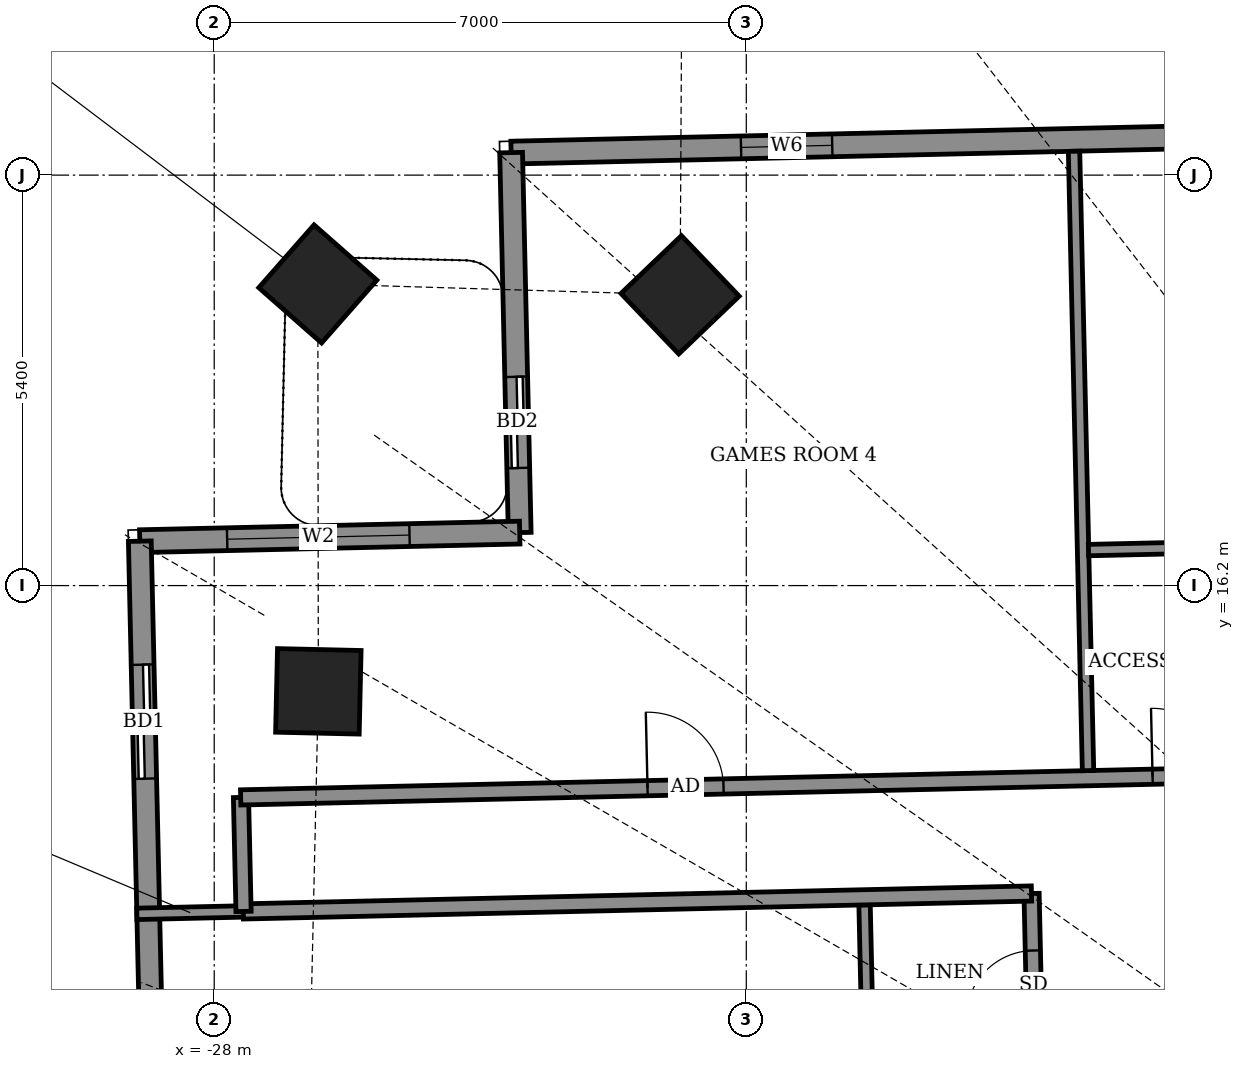
"""IFC4 building model, lengths in metres.
Left out: names, types, materials, properties, quantities, classifications, styles, units other than length and angle.
Written with IfcOpenShell. Run it as: python <this file> out.ifc"""

import sys

from ifc_helpers import new_model, si_unit, direction, frame, frame_2d, origin, origin_2d, place, context, subcontext, project, spatial, rectangle, extrude, element, fill, save


model = new_model("IFC4")
c1 = context("Model", 3, precision=1e-05, world=origin(), true_north=direction((0.0, 1.0)))
c2 = subcontext(c1, "Body", "Model", "MODEL_VIEW")
j1 = project(units=[si_unit("LENGTHUNIT", "METRE"), si_unit("PLANEANGLEUNIT", "RADIAN")], contexts=[c1])
p1 = place(None, origin())
s1 = spatial("IfcSite", under=j1, at=p1, CompositionType="ELEMENT")
p2 = place(p1, origin())
s2 = spatial("IfcBuilding", under=s1, at=p2, CompositionType="ELEMENT")
p3 = place(p2, frame((0.0, 0.0, 226.5)))
s3 = spatial("IfcBuildingStorey", under=s2, at=p3, CompositionType="ELEMENT", Elevation=226.5)
for number, where, z_axis, x_axis in (
    (1, (-21.871, 20.025, -0.55), (0.0, 0.0, 1.0), (-0.723, -0.691, 0.0)),
    (2, (-26.637, 20.169, -0.55), (0.0, 0.0, 1.0), (-0.661, -0.751, 0.0)),
    (3, (-26.63, 14.809, -0.55), (0.0, 0.0, 1.0), (-0.023, -1.0, 0.0)),
):
    element("IfcColumn", number, at=place(p3, frame(where, z_axis=z_axis, x_axis=x_axis)), inside=s3, PredefinedType="COLUMN", context=c2, shape_type="SweptSolid", body=[
        extrude(rectangle(XDim=1.1, YDim=1.1, at=origin_2d()), origin(), (0.0, 0.0, 1.0), 4.6),
    ])
p4 = place(p3, frame((20.403, 22.905, 0.0), z_axis=(0.0, 0.0, 1.0), x_axis=(-0.99974298964, -0.022670568288, 0.0)))
e4 = element("IfcWall", 4, at=p4, inside=s3, PredefinedType="SOLIDWALL", context=c2, shape_type="SweptSolid", body=[
    extrude(rectangle(XDim=44.509, YDim=0.3, at=frame_2d((22.254, 0.0))), origin(), (0.0, 0.0, 1.0), 2.45),
])
p5 = place(p4, frame((2.846, 0.0, 0.0)))
e5 = element("IfcOpeningElement", 5, at=p5, cuts=e4, PredefinedType="OPENING", context=c2, shape_type="SweptSolid", body=[
    extrude(rectangle(XDim=1.5, YDim=2.0, at=frame_2d((0.75, 1.0))), frame((0.0, 0.16, 0.0), z_axis=(0.0, -1.0, 0.0), x_axis=(1.0, 0.0, 0.0)), (0.0, 0.0, 1.0), 0.32),
])
p6 = place(p4, frame((9.937, 0.0, 0.5)))
e6 = element("IfcOpeningElement", 6, at=p6, cuts=e4, PredefinedType="OPENING", context=c2, shape_type="SweptSolid", body=[
    extrude(rectangle(XDim=1.2, YDim=1.1, at=frame_2d((0.6, 0.55))), frame((0.0, 0.16, 0.0), z_axis=(0.0, -1.0, 0.0), x_axis=(1.0, 0.0, 0.0)), (0.0, 0.0, 1.0), 0.32),
])
p7 = place(p4, frame((17.433, 0.0, 0.5)))
e7 = element("IfcOpeningElement", 7, at=p7, cuts=e4, PredefinedType="OPENING", context=c2, shape_type="SweptSolid", body=[
    extrude(rectangle(XDim=1.2, YDim=1.1, at=frame_2d((0.6, 0.55))), frame((0.0, 0.16, 0.0), z_axis=(0.0, -1.0, 0.0), x_axis=(1.0, 0.0, 0.0)), (0.0, 0.0, 1.0), 0.32),
])
p8 = place(p4, frame((22.808, 0.0, 0.0)))
e8 = element("IfcOpeningElement", 8, at=p8, cuts=e4, PredefinedType="OPENING", context=c2, shape_type="SweptSolid", body=[
    extrude(rectangle(XDim=1.5, YDim=2.0, at=frame_2d((0.75, 1.0))), frame((0.0, 0.16, 0.0), z_axis=(0.0, -1.0, 0.0), x_axis=(1.0, 0.0, 0.0)), (0.0, 0.0, 1.0), 0.32),
])
p9 = place(p4, frame((27.808, 0.0, 0.0)))
e9 = element("IfcOpeningElement", 9, at=p9, cuts=e4, PredefinedType="OPENING", context=c2, shape_type="SweptSolid", body=[
    extrude(rectangle(XDim=1.5, YDim=2.0, at=frame_2d((0.75, 1.0))), frame((0.0, 0.16, 0.0), z_axis=(0.0, -1.0, 0.0), x_axis=(1.0, 0.0, 0.0)), (0.0, 0.0, 1.0), 0.32),
])
p10 = place(p4, frame((33.483, 0.0, 0.5)))
e10 = element("IfcOpeningElement", 10, at=p10, cuts=e4, PredefinedType="OPENING", context=c2, shape_type="SweptSolid", body=[
    extrude(rectangle(XDim=1.2, YDim=1.1, at=frame_2d((0.6, 0.55))), frame((0.0, 0.16, 0.0), z_axis=(0.0, -1.0, 0.0), x_axis=(1.0, 0.0, 0.0)), (0.0, 0.0, 1.0), 0.32),
])
p11 = place(p4, frame((40.283, 0.0, 0.5)))
e11 = element("IfcOpeningElement", 11, at=p11, cuts=e4, PredefinedType="OPENING", context=c2, shape_type="SweptSolid", body=[
    extrude(rectangle(XDim=1.2, YDim=1.1, at=frame_2d((0.6, 0.55))), frame((0.0, 0.16, 0.0), z_axis=(0.0, -1.0, 0.0), x_axis=(1.0, 0.0, 0.0)), (0.0, 0.0, 1.0), 0.32),
])
p12 = place(p3, frame((-24.094, 21.896, 0.0), z_axis=(0.0, 0.0, 1.0), x_axis=(0.022606059803, -0.999744450377, 0.0)))
e12 = element("IfcWall", 12, at=p12, inside=s3, PredefinedType="SOLIDWALL", context=c2, shape_type="SweptSolid", body=[
    extrude(rectangle(XDim=5.0, YDim=0.3, at=frame_2d((2.5, 0.0))), origin(), (0.0, 0.0, 1.0), 2.55),
])
p13 = place(p12, frame((2.95, 0.0, 0.0)))
e13 = element("IfcOpeningElement", 13, at=p13, cuts=e12, PredefinedType="OPENING", context=c2, shape_type="SweptSolid", body=[
    extrude(rectangle(XDim=1.2, YDim=2.4, at=frame_2d((0.6, 1.2))), frame((0.0, 0.16, 0.0), z_axis=(0.0, -1.0, 0.0), x_axis=(1.0, 0.0, 0.0)), (0.0, 0.0, 1.0), 0.32),
])
p14 = place(p3, frame((-23.981, 16.897, 0.0), z_axis=(0.0, 0.0, 1.0), x_axis=(-0.999744350543, -0.022610474516, 0.0)))
e14 = element("IfcWall", 14, at=p14, inside=s3, PredefinedType="SOLIDWALL", context=c2, shape_type="SweptSolid", body=[
    extrude(rectangle(XDim=4.999, YDim=0.3, at=frame_2d((2.5, 0.0))), origin(), (0.0, 0.0, 1.0), 2.55),
])
p15 = place(p14, frame((1.45, 0.0, 0.9)))
e15 = element("IfcOpeningElement", 15, at=p15, cuts=e14, PredefinedType="OPENING", context=c2, shape_type="SweptSolid", body=[
    extrude(rectangle(XDim=2.4, YDim=1.5, at=frame_2d((1.2, 0.75))), frame((0.0, 0.16, 0.0), z_axis=(0.0, -1.0, 0.0), x_axis=(1.0, 0.0, 0.0)), (0.0, 0.0, 1.0), 0.32),
])
p16 = place(p3, frame((-28.979, 16.784, 0.0), z_axis=(0.0, 0.0, 1.0), x_axis=(0.022639069896, -0.999743703413, 0.0)))
e16 = element("IfcWall", 16, at=p16, inside=s3, PredefinedType="SOLIDWALL", context=c2, shape_type="SweptSolid", body=[
    extrude(rectangle(XDim=12.326, YDim=0.3, at=frame_2d((6.163, 0.0))), origin(), (0.0, 0.0, 1.0), 2.65),
])
p17 = place(p16, frame((1.625, 0.0, 0.0)))
e17 = element("IfcOpeningElement", 17, at=p17, cuts=e16, PredefinedType="OPENING", context=c2, shape_type="SweptSolid", body=[
    extrude(rectangle(XDim=1.5, YDim=2.4, at=frame_2d((0.75, 1.2))), frame((0.0, 0.16, 0.0), z_axis=(0.0, -1.0, 0.0), x_axis=(1.0, 0.0, 0.0)), (0.0, 0.0, 1.0), 0.32),
])
p18 = place(p16, frame((7.338, 0.0, 0.9)))
e18 = element("IfcOpeningElement", 18, at=p18, cuts=e16, PredefinedType="OPENING", context=c2, shape_type="SweptSolid", body=[
    extrude(rectangle(XDim=2.4, YDim=1.5, at=frame_2d((1.2, 0.75))), frame((0.0, 0.16, 0.0), z_axis=(0.0, -1.0, 0.0), x_axis=(1.0, 0.0, 0.0)), (0.0, 0.0, 1.0), 0.32),
])
p19 = place(p3, frame((-16.678, -12.919, 0.0), z_axis=(0.0, 0.0, 1.0), x_axis=(-0.022696191528, 0.999742408268, 0.0)))
e19 = element("IfcWall", 19, at=p19, inside=s3, PredefinedType="PARTITIONING", context=c2, shape_type="SweptSolid", body=[
    extrude(rectangle(XDim=25.074, YDim=0.2, at=frame_2d((12.537, 0.0))), origin(), (0.0, 0.0, 1.0), 2.65),
])
p20 = place(p19, frame((19.737, 0.0, 0.0)))
e20 = element("IfcOpeningElement", 20, at=p20, cuts=e19, PredefinedType="OPENING", context=c2, shape_type="SweptSolid", body=[
    extrude(rectangle(XDim=1.0, YDim=2.1, at=frame_2d((0.5, 1.05))), frame((0.0, 0.11, 0.0), z_axis=(0.0, -1.0, 0.0), x_axis=(1.0, 0.0, 0.0)), (0.0, 0.0, 1.0), 0.22),
])
p21 = place(p19, frame((23.424, 0.0, 0.0)))
e21 = element("IfcOpeningElement", 21, at=p21, cuts=e19, PredefinedType="OPENING", context=c2, shape_type="SweptSolid", body=[
    extrude(rectangle(XDim=0.9, YDim=2.1, at=frame_2d((0.45, 1.05))), frame((0.0, 0.11, 0.0), z_axis=(0.0, -1.0, 0.0), x_axis=(1.0, 0.0, 0.0)), (0.0, 0.0, 1.0), 0.22),
])
p22 = place(p19, frame((13.624, 0.0, 0.0)))
e22 = element("IfcOpeningElement", 22, at=p22, cuts=e19, PredefinedType="OPENING", context=c2, shape_type="SweptSolid", body=[
    extrude(rectangle(XDim=1.0, YDim=2.1, at=frame_2d((0.5, 1.05))), frame((0.0, 0.11, 0.0), z_axis=(0.0, -1.0, 0.0), x_axis=(1.0, 0.0, 0.0)), (0.0, 0.0, 1.0), 0.22),
])
p23 = place(p19, frame((16.049, 0.0, 0.0)))
e23 = element("IfcOpeningElement", 23, at=p23, cuts=e19, PredefinedType="OPENING", context=c2, shape_type="SweptSolid", body=[
    extrude(rectangle(XDim=0.9, YDim=2.1, at=frame_2d((0.45, 1.05))), frame((0.0, 0.11, 0.0), z_axis=(0.0, -1.0, 0.0), x_axis=(1.0, 0.0, 0.0)), (0.0, 0.0, 1.0), 0.22),
])
p24 = place(p19, frame((11.449, 0.0, 0.0)))
e24 = element("IfcOpeningElement", 24, at=p24, cuts=e19, PredefinedType="OPENING", context=c2, shape_type="SweptSolid", body=[
    extrude(rectangle(XDim=1.0, YDim=2.1, at=frame_2d((0.5, 1.05))), frame((0.0, 0.11, 0.0), z_axis=(0.0, -1.0, 0.0), x_axis=(1.0, 0.0, 0.0)), (0.0, 0.0, 1.0), 0.22),
])
p25 = place(p19, frame((9.199, 0.0, 0.0)))
e25 = element("IfcOpeningElement", 25, at=p25, cuts=e19, PredefinedType="OPENING", context=c2, shape_type="SweptSolid", body=[
    extrude(rectangle(XDim=0.9, YDim=2.1, at=frame_2d((0.45, 1.05))), frame((0.0, 0.11, 0.0), z_axis=(0.0, -1.0, 0.0), x_axis=(1.0, 0.0, 0.0)), (0.0, 0.0, 1.0), 0.22),
])
p26 = place(p19, frame((4.549, 0.0, 0.0)))
e26 = element("IfcOpeningElement", 26, at=p26, cuts=e19, PredefinedType="OPENING", context=c2, shape_type="SweptSolid", body=[
    extrude(rectangle(XDim=1.0, YDim=2.1, at=frame_2d((0.5, 1.05))), frame((0.0, 0.11, 0.0), z_axis=(0.0, -1.0, 0.0), x_axis=(1.0, 0.0, 0.0)), (0.0, 0.0, 1.0), 0.22),
])
p27 = place(p19, frame((6.799, 0.0, 0.0)))
e27 = element("IfcOpeningElement", 27, at=p27, cuts=e19, PredefinedType="OPENING", context=c2, shape_type="SweptSolid", body=[
    extrude(rectangle(XDim=0.9, YDim=2.1, at=frame_2d((0.45, 1.05))), frame((0.0, 0.11, 0.0), z_axis=(0.0, -1.0, 0.0), x_axis=(1.0, 0.0, 0.0)), (0.0, 0.0, 1.0), 0.22),
])
p28 = place(p3, frame((-19.392, 9.699, 0.0), z_axis=(0.0, 0.0, 1.0), x_axis=(-0.022603288534, 0.999744513037, 0.0)))
e28 = element("IfcWall", 28, at=p28, inside=s3, PredefinedType="PARTITIONING", context=c2, shape_type="SweptSolid", body=[
    extrude(rectangle(XDim=2.301, YDim=0.15, at=frame_2d((1.15, 0.0))), origin(), (0.0, 0.0, 1.0), 2.65),
])
p29 = place(p3, frame((-29.018, 11.881, 0.0), z_axis=(0.0, 0.0, 1.0), x_axis=(0.999740667531, 0.022772739949, 0.0)))
e29 = element("IfcWall", 29, at=p29, inside=s3, PredefinedType="PARTITIONING", context=c2, shape_type="SweptSolid", body=[
    extrude(rectangle(XDim=1.404, YDim=0.15, at=frame_2d((0.702, 0.0))), origin(), (0.0, 0.0, 1.0), 4.05),
])
p30 = place(p3, frame((-27.618, 11.913, 0.0), z_axis=(0.0, 0.0, 1.0), x_axis=(0.999741483035, 0.022736910479, 0.0)))
e30 = element("IfcWall", 30, at=p30, inside=s3, PredefinedType="PARTITIONING", context=c2, shape_type="SweptSolid", body=[
    extrude(rectangle(XDim=10.373, YDim=0.2, at=frame_2d((5.186, 0.0))), origin(), (0.0, 0.0, 1.0), 2.55),
])
p31 = place(p3, frame((-27.614, 11.913, 0.0), z_axis=(0.0, 0.0, 1.0), x_axis=(-0.022617910375, 0.999744182344, 0.0)))
e31 = element("IfcWall", 31, at=p31, inside=s3, PredefinedType="PARTITIONING", context=c2, shape_type="SweptSolid", body=[
    extrude(rectangle(XDim=1.5, YDim=0.2, at=frame_2d((0.75, 0.0))), origin(), (0.0, 0.0, 1.0), 4.05),
])
p32 = place(p3, frame((-27.652, 13.413, 0.0), z_axis=(0.0, 0.0, 1.0), x_axis=(0.999742712492, 0.022682786863, 0.0)))
e32 = element("IfcWall", 32, at=p32, inside=s3, PredefinedType="PARTITIONING", context=c2, shape_type="SweptSolid", body=[
    extrude(rectangle(XDim=49.113, YDim=0.2, at=frame_2d((24.556, 0.0))), origin(), (0.0, 0.0, 1.0), 2.45),
])
p33 = place(p32, frame((47.529, 0.0, 0.0)))
e33 = element("IfcOpeningElement", 33, at=p33, cuts=e32, PredefinedType="OPENING", context=c2, shape_type="SweptSolid", body=[
    extrude(rectangle(XDim=1.0, YDim=2.1, at=frame_2d((0.5, 1.05))), frame((0.0, 0.11, 0.0), z_axis=(0.0, -1.0, 0.0), x_axis=(1.0, 0.0, 0.0)), (0.0, 0.0, 1.0), 0.22),
])
p34 = place(p32, frame((41.6, 0.0, 0.0)))
e34 = element("IfcOpeningElement", 34, at=p34, cuts=e32, PredefinedType="OPENING", context=c2, shape_type="SweptSolid", body=[
    extrude(rectangle(XDim=0.9, YDim=2.1, at=frame_2d((0.45, 1.05))), frame((0.0, 0.11, 0.0), z_axis=(0.0, -1.0, 0.0), x_axis=(1.0, 0.0, 0.0)), (0.0, 0.0, 1.0), 0.22),
])
p35 = place(p32, frame((37.85, 0.0, 0.0)))
e35 = element("IfcOpeningElement", 35, at=p35, cuts=e32, PredefinedType="OPENING", context=c2, shape_type="SweptSolid", body=[
    extrude(rectangle(XDim=1.0, YDim=2.1, at=frame_2d((0.5, 1.05))), frame((0.0, 0.11, 0.0), z_axis=(0.0, -1.0, 0.0), x_axis=(1.0, 0.0, 0.0)), (0.0, 0.0, 1.0), 0.22),
])
p36 = place(p32, frame((34.1, 0.0, 0.0)))
e36 = element("IfcOpeningElement", 36, at=p36, cuts=e32, PredefinedType="OPENING", context=c2, shape_type="SweptSolid", body=[
    extrude(rectangle(XDim=0.9, YDim=2.1, at=frame_2d((0.45, 1.05))), frame((0.0, 0.11, 0.0), z_axis=(0.0, -1.0, 0.0), x_axis=(1.0, 0.0, 0.0)), (0.0, 0.0, 1.0), 0.22),
])
p37 = place(p32, frame((28.525, 0.0, 0.0)))
e37 = element("IfcOpeningElement", 37, at=p37, cuts=e32, PredefinedType="OPENING", context=c2, shape_type="SweptSolid", body=[
    extrude(rectangle(XDim=1.0, YDim=2.1, at=frame_2d((0.5, 1.05))), frame((0.0, 0.11, 0.0), z_axis=(0.0, -1.0, 0.0), x_axis=(1.0, 0.0, 0.0)), (0.0, 0.0, 1.0), 0.22),
])
p38 = place(p32, frame((31.6, 0.0, 0.0)))
e38 = element("IfcOpeningElement", 38, at=p38, cuts=e32, PredefinedType="OPENING", context=c2, shape_type="SweptSolid", body=[
    extrude(rectangle(XDim=0.9, YDim=2.1, at=frame_2d((0.45, 1.05))), frame((0.0, 0.11, 0.0), z_axis=(0.0, -1.0, 0.0), x_axis=(1.0, 0.0, 0.0)), (0.0, 0.0, 1.0), 0.22),
])
p39 = place(p32, frame((25.45, 0.0, 0.0)))
e39 = element("IfcOpeningElement", 39, at=p39, cuts=e32, PredefinedType="OPENING", context=c2, shape_type="SweptSolid", body=[
    extrude(rectangle(XDim=0.9, YDim=2.1, at=frame_2d((0.45, 1.05))), frame((0.0, 0.11, 0.0), z_axis=(0.0, -1.0, 0.0), x_axis=(1.0, 0.0, 0.0)), (0.0, 0.0, 1.0), 0.22),
])
p40 = place(p32, frame((18.05, 0.0, 0.0)))
e40 = element("IfcOpeningElement", 40, at=p40, cuts=e32, PredefinedType="OPENING", context=c2, shape_type="SweptSolid", body=[
    extrude(rectangle(XDim=0.9, YDim=2.1, at=frame_2d((0.45, 1.05))), frame((0.0, 0.11, 0.0), z_axis=(0.0, -1.0, 0.0), x_axis=(1.0, 0.0, 0.0)), (0.0, 0.0, 1.0), 0.22),
])
p41 = place(p32, frame((14.975, 0.0, 0.0)))
e41 = element("IfcOpeningElement", 41, at=p41, cuts=e32, PredefinedType="OPENING", context=c2, shape_type="SweptSolid", body=[
    extrude(rectangle(XDim=1.0, YDim=2.1, at=frame_2d((0.5, 1.05))), frame((0.0, 0.11, 0.0), z_axis=(0.0, -1.0, 0.0), x_axis=(1.0, 0.0, 0.0)), (0.0, 0.0, 1.0), 0.22),
])
p42 = place(p32, frame((12.0, 0.0, 0.0)))
e42 = element("IfcOpeningElement", 42, at=p42, cuts=e32, PredefinedType="OPENING", context=c2, shape_type="SweptSolid", body=[
    extrude(rectangle(XDim=0.9, YDim=2.1, at=frame_2d((0.45, 1.05))), frame((0.0, 0.11, 0.0), z_axis=(0.0, -1.0, 0.0), x_axis=(1.0, 0.0, 0.0)), (0.0, 0.0, 1.0), 0.22),
])
p43 = place(p32, frame((5.354, 0.0, 0.0)))
e43 = element("IfcOpeningElement", 43, at=p43, cuts=e32, PredefinedType="OPENING", context=c2, shape_type="SweptSolid", body=[
    extrude(rectangle(XDim=1.0, YDim=2.1, at=frame_2d((0.5, 1.05))), frame((0.0, 0.11, 0.0), z_axis=(0.0, -1.0, 0.0), x_axis=(1.0, 0.0, 0.0)), (0.0, 0.0, 1.0), 0.22),
])
p44 = place(p3, frame((-16.504, 13.766, 0.0), z_axis=(0.0, 0.0, 1.0), x_axis=(-0.022586673637, 0.999744888546, 0.0)))
e44 = element("IfcWall", 44, at=p44, inside=s3, PredefinedType="PARTITIONING", context=c2, shape_type="SweptSolid", body=[
    extrude(rectangle(XDim=8.15, YDim=0.15, at=frame_2d((4.075, 0.0))), origin(), (0.0, 0.0, 1.0), 2.45),
])
p45 = place(p3, frame((-16.498, 16.667, 0.0), z_axis=(0.0, 0.0, 1.0), x_axis=(0.99974392816, 0.022629142889, 0.0)))
e45 = element("IfcWall", 45, at=p45, inside=s3, PredefinedType="PARTITIONING", context=c2, shape_type="SweptSolid", body=[
    extrude(rectangle(XDim=2.525, YDim=0.15, at=frame_2d((1.262, 0.0))), origin(), (0.0, 0.0, 1.0), 4.05),
])
p46 = place(p11, origin())
e46 = element("IfcWindow", 46, at=p46, inside=s3, PartitioningType="SINGLE_PANEL", PredefinedType="WINDOW", context=c2, shape_type="SweptSolid", body=[
    extrude(rectangle(XDim=1.2, YDim=1.1, at=frame_2d((0.6, 0.55))), frame((0.0, 0.03, 0.0), z_axis=(0.0, -1.0, 0.0), x_axis=(1.0, 0.0, 0.0)), (0.0, 0.0, 1.0), 0.06),
])
fill(e11, e46)
p47 = place(p13, origin())
e47 = element("IfcDoor", 47, at=p47, inside=s3, OperationType="SLIDING_TO_LEFT", PredefinedType="DOOR", context=c2, shape_type="SweptSolid", body=[
    extrude(rectangle(XDim=1.2, YDim=2.4, at=frame_2d((0.6, 1.2))), frame((0.0, 0.025, 0.0), z_axis=(0.0, -1.0, 0.0), x_axis=(1.0, 0.0, 0.0)), (0.0, 0.0, 1.0), 0.05),
])
fill(e13, e47)
p48 = place(p15, origin())
e48 = element("IfcWindow", 48, at=p48, inside=s3, PartitioningType="DOUBLE_PANEL_VERTICAL", PredefinedType="WINDOW", context=c2, shape_type="SweptSolid", body=[
    extrude(rectangle(XDim=2.4, YDim=1.5, at=frame_2d((1.2, 0.75))), frame((0.0, 0.03, 0.0), z_axis=(0.0, -1.0, 0.0), x_axis=(1.0, 0.0, 0.0)), (0.0, 0.0, 1.0), 0.06),
])
fill(e15, e48)
p49 = place(p17, origin())
e49 = element("IfcDoor", 49, at=p49, inside=s3, OperationType="SLIDING_TO_LEFT", PredefinedType="DOOR", context=c2, shape_type="SweptSolid", body=[
    extrude(rectangle(XDim=1.5, YDim=2.4, at=frame_2d((0.75, 1.2))), frame((0.0, 0.025, 0.0), z_axis=(0.0, -1.0, 0.0), x_axis=(1.0, 0.0, 0.0)), (0.0, 0.0, 1.0), 0.05),
])
fill(e17, e49)
p50 = place(p42, origin())
e50 = element("IfcDoor", 50, at=p50, inside=s3, OperationType="SINGLE_SWING_LEFT", PredefinedType="DOOR", context=c2, shape_type="SweptSolid", body=[
    extrude(rectangle(XDim=0.9, YDim=2.1, at=frame_2d((0.45, 1.05))), frame((0.0, 0.025, 0.0), z_axis=(0.0, -1.0, 0.0), x_axis=(1.0, 0.0, 0.0)), (0.0, 0.0, 1.0), 0.05),
])
fill(e42, e50)
p51 = place(p43, origin())
e51 = element("IfcDoor", 51, at=p51, inside=s3, OperationType="SINGLE_SWING_LEFT", PredefinedType="DOOR", context=c2, shape_type="SweptSolid", body=[
    extrude(rectangle(XDim=1.0, YDim=2.1, at=frame_2d((0.5, 1.05))), frame((0.0, 0.025, 0.0), z_axis=(0.0, -1.0, 0.0), x_axis=(1.0, 0.0, 0.0)), (0.0, 0.0, 1.0), 0.05),
])
fill(e43, e51)
p52 = place(p21, origin())
e52 = element("IfcDoor", 52, at=p52, inside=s3, OperationType="SINGLE_SWING_RIGHT", PredefinedType="DOOR", context=c2, shape_type="SweptSolid", body=[
    extrude(rectangle(XDim=0.9, YDim=2.1, at=frame_2d((0.45, 1.05))), frame((0.0, 0.025, 0.0), z_axis=(0.0, -1.0, 0.0), x_axis=(1.0, 0.0, 0.0)), (0.0, 0.0, 1.0), 0.05),
])
fill(e21, e52)
save(model, sys.argv[1])
